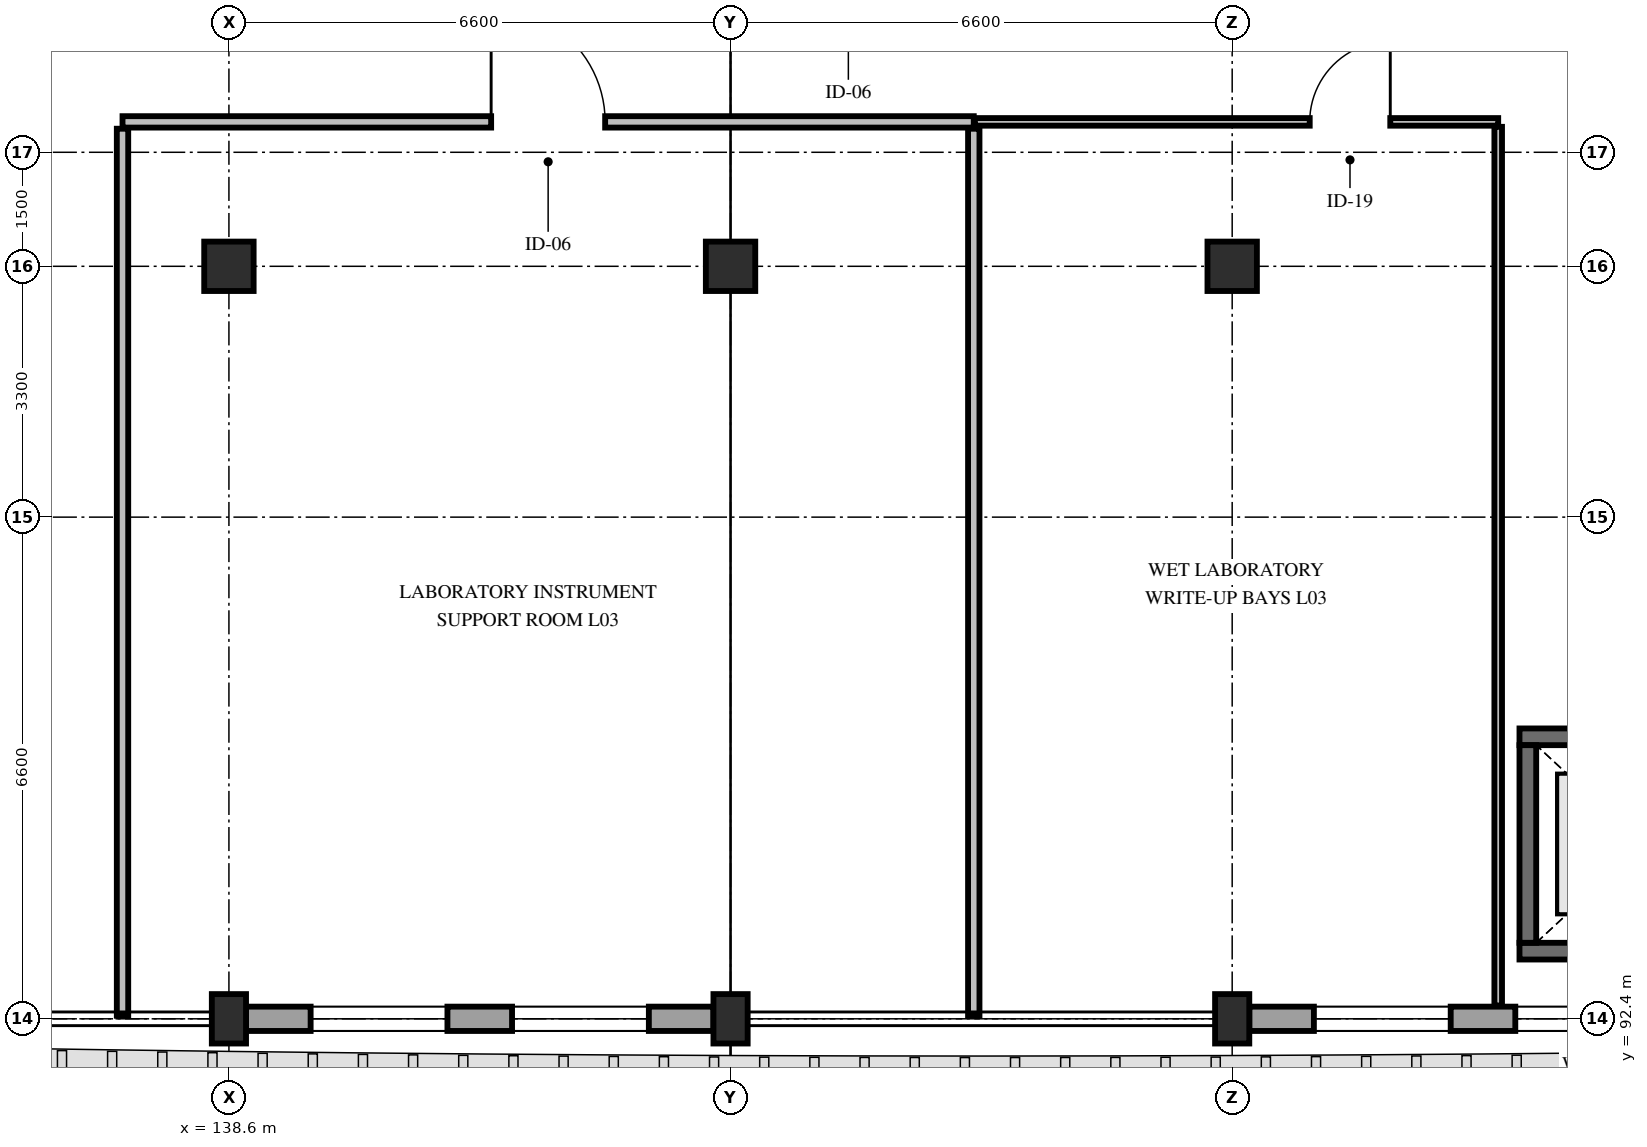
"""IFC4 building model, lengths in metres.
Left out: names, types, materials, properties, quantities, classifications, styles, units other than length and angle.
Written with IfcOpenShell. Run it as: python <this file> out.ifc"""

import sys

from ifc_helpers import new_model, si_unit, direction, frame, frame_2d, origin, origin_2d, place, context, subcontext, project, spatial, rectangle, extrude, element, fill, save


model = new_model("IFC4")
c1 = context("Model", 3, precision=1e-05, world=origin(), true_north=direction((0.0, 1.0)))
c2 = subcontext(c1, "Body", "Model", "MODEL_VIEW")
j1 = project(units=[si_unit("LENGTHUNIT", "METRE"), si_unit("PLANEANGLEUNIT", "RADIAN")], contexts=[c1])
p1 = place(None, origin())
s1 = spatial("IfcSite", under=j1, at=p1, CompositionType="ELEMENT")
p2 = place(p1, origin())
s2 = spatial("IfcBuilding", under=s1, at=p2, CompositionType="ELEMENT")
p3 = place(p2, frame((0.0, 0.0, 15.0)))
s3 = spatial("IfcBuildingStorey", under=s2, at=p3, CompositionType="ELEMENT", Elevation=15.0)
p4 = place(p3, frame((138.6, 92.4, 0.0), z_axis=(0.0, 0.0, 1.0), x_axis=(1.0, 0.0, 0.0)))
e1 = element("IfcColumn", 1, at=p4, inside=s3, PredefinedType="PILASTER", context=c2, shape_type="SweptSolid", body=[
    extrude(rectangle(XDim=0.45, YDim=0.65, at=origin_2d()), origin(), (0.0, 0.0, 1.0), 4.8),
])
p5 = place(p3, frame((138.6, 102.3, 0.0), z_axis=(0.0, 0.0, 1.0), x_axis=(1.0, 0.0, 0.0)))
e2 = element("IfcColumn", 2, at=p5, inside=s3, PredefinedType="COLUMN", context=c2, shape_type="SweptSolid", body=[
    extrude(rectangle(XDim=0.65, YDim=0.65, at=origin_2d()), origin(), (0.0, 0.0, 1.0), 4.8),
])
p6 = place(p3, frame((145.2, 92.4, 0.0), z_axis=(0.0, 0.0, 1.0), x_axis=(1.0, 0.0, 0.0)))
e3 = element("IfcColumn", 3, at=p6, inside=s3, PredefinedType="PILASTER", context=c2, shape_type="SweptSolid", body=[
    extrude(rectangle(XDim=0.45, YDim=0.65, at=origin_2d()), origin(), (0.0, 0.0, 1.0), 4.8),
])
p7 = place(p3, frame((145.2, 102.3, 0.0), z_axis=(0.0, 0.0, 1.0), x_axis=(1.0, 0.0, 0.0)))
e4 = element("IfcColumn", 4, at=p7, inside=s3, PredefinedType="COLUMN", context=c2, shape_type="SweptSolid", body=[
    extrude(rectangle(XDim=0.65, YDim=0.65, at=origin_2d()), origin(), (0.0, 0.0, 1.0), 4.8),
])
p8 = place(p3, frame((151.8, 92.4, 0.0), z_axis=(0.0, 0.0, 1.0), x_axis=(1.0, 0.0, 0.0)))
e5 = element("IfcColumn", 5, at=p8, inside=s3, PredefinedType="PILASTER", context=c2, shape_type="SweptSolid", body=[
    extrude(rectangle(XDim=0.45, YDim=0.65, at=origin_2d()), origin(), (0.0, 0.0, 1.0), 4.8),
])
p9 = place(p3, frame((151.8, 102.3, 0.0), z_axis=(0.0, 0.0, 1.0), x_axis=(1.0, 0.0, 0.0)))
e6 = element("IfcColumn", 6, at=p9, inside=s3, PredefinedType="COLUMN", context=c2, shape_type="SweptSolid", body=[
    extrude(rectangle(XDim=0.65, YDim=0.65, at=origin_2d()), origin(), (0.0, 0.0, 1.0), 4.8),
])
p10 = place(p3, frame((158.175, 92.4, 0.0), z_axis=(0.0, 0.0, 1.0), x_axis=(-1.0, 0.0, 0.0)))
e7 = element("IfcWall", 7, at=p10, inside=s3, PredefinedType="STANDARD", context=c2, shape_type="SweptSolid", body=[
    extrude(rectangle(XDim=6.15, YDim=0.32, at=frame_2d((3.075, 0.0))), origin(), (0.0, 0.0, 1.0), 3.78),
])
p11 = place(p10, frame((0.85, 0.0, 0.85)))
e8 = element("IfcOpeningElement", 8, at=p11, cuts=e7, PredefinedType="OPENING", context=c2, shape_type="SweptSolid", body=[
    extrude(rectangle(XDim=1.8, YDim=2.24, at=frame_2d((0.9, 1.12))), frame((0.0, 0.175, 0.0), z_axis=(0.0, -1.0, 0.0), x_axis=(1.0, 0.0, 0.0)), (0.0, 0.0, 1.0), 0.35),
])
p12 = place(p10, frame((3.5, 0.0, 0.85)))
e9 = element("IfcOpeningElement", 9, at=p12, cuts=e7, PredefinedType="OPENING", context=c2, shape_type="SweptSolid", body=[
    extrude(rectangle(XDim=1.8, YDim=2.24, at=frame_2d((0.9, 1.12))), frame((0.0, 0.175, 0.0), z_axis=(0.0, -1.0, 0.0), x_axis=(1.0, 0.0, 0.0)), (0.0, 0.0, 1.0), 0.35),
])
p13 = place(p3, frame((144.975, 92.4, 0.0), z_axis=(0.0, 0.0, 1.0), x_axis=(-1.0, 0.0, 0.0)))
e10 = element("IfcWall", 10, at=p13, inside=s3, PredefinedType="STANDARD", context=c2, shape_type="SweptSolid", body=[
    extrude(rectangle(XDim=6.15, YDim=0.32, at=frame_2d((3.075, 0.0))), origin(), (0.0, 0.0, 1.0), 3.78),
])
p14 = place(p13, frame((0.85, 0.0, 0.85)))
e11 = element("IfcOpeningElement", 11, at=p14, cuts=e10, PredefinedType="OPENING", context=c2, shape_type="SweptSolid", body=[
    extrude(rectangle(XDim=1.8, YDim=2.24, at=frame_2d((0.9, 1.12))), frame((0.0, 0.175, 0.0), z_axis=(0.0, -1.0, 0.0), x_axis=(1.0, 0.0, 0.0)), (0.0, 0.0, 1.0), 0.35),
])
p15 = place(p13, frame((3.5, 0.0, 0.85)))
e12 = element("IfcOpeningElement", 12, at=p15, cuts=e10, PredefinedType="OPENING", context=c2, shape_type="SweptSolid", body=[
    extrude(rectangle(XDim=1.8, YDim=2.24, at=frame_2d((0.9, 1.12))), frame((0.0, 0.175, 0.0), z_axis=(0.0, -1.0, 0.0), x_axis=(1.0, 0.0, 0.0)), (0.0, 0.0, 1.0), 0.35),
])
p16 = place(p3, frame((155.58, 93.29, 0.0), z_axis=(0.0, 0.0, 1.0), x_axis=(1.0, 0.0, 0.0)))
e13 = element("IfcWall", 13, at=p16, inside=s3, PredefinedType="SHEAR", context=c2, shape_type="SweptSolid", body=[
    extrude(rectangle(XDim=3.24, YDim=0.22, at=frame_2d((1.62, 0.0))), origin(), (0.0, 0.0, 1.0), 4.48),
])
p17 = place(p3, frame((155.58, 96.11, 0.0), z_axis=(0.0, 0.0, 1.0), x_axis=(1.0, 0.0, 0.0)))
e14 = element("IfcWall", 14, at=p17, inside=s3, PredefinedType="SHEAR", context=c2, shape_type="SweptSolid", body=[
    extrude(rectangle(XDim=3.24, YDim=0.22, at=frame_2d((1.62, 0.0))), origin(), (0.0, 0.0, 1.0), 4.48),
])
p18 = place(p17, frame((0.92, 0.0, 0.0)))
e15 = element("IfcOpeningElement", 15, at=p18, cuts=e14, PredefinedType="OPENING", context=c2, shape_type="SweptSolid", body=[
    extrude(rectangle(XDim=1.4, YDim=2.3, at=frame_2d((0.7, 1.15))), frame((0.0, 0.125, 0.0), z_axis=(0.0, -1.0, 0.0), x_axis=(1.0, 0.0, 0.0)), (0.0, 0.0, 1.0), 0.25),
])
p19 = place(p3, frame((155.69, 93.4, 0.0), z_axis=(0.0, 0.0, 1.0), x_axis=(0.0, 1.0, 0.0)))
e16 = element("IfcWall", 16, at=p19, inside=s3, PredefinedType="SHEAR", context=c2, shape_type="SweptSolid", body=[
    extrude(rectangle(XDim=2.6, YDim=0.22, at=frame_2d((1.3, 0.0))), origin(), (0.0, 0.0, 1.0), 4.48),
])
p20 = place(p3, frame((137.2, 104.2, 0.0), z_axis=(0.0, 0.0, 1.0), x_axis=(1.0, 0.0, 0.0)))
e17 = element("IfcWall", 17, at=p20, inside=s3, PredefinedType="PARTITIONING", context=c2, shape_type="SweptSolid", body=[
    extrude(rectangle(XDim=11.2, YDim=0.15, at=frame_2d((5.6, 0.0))), origin(), (0.0, 0.0, 1.0), 3.78),
])
p21 = place(p20, frame((4.85, 0.0, 0.0)))
e18 = element("IfcOpeningElement", 18, at=p21, cuts=e17, PredefinedType="OPENING", context=c2, shape_type="SweptSolid", body=[
    extrude(rectangle(XDim=1.5, YDim=2.25, at=frame_2d((0.75, 1.125))), frame((0.0, 0.09, 0.0), z_axis=(0.0, -1.0, 0.0), x_axis=(1.0, 0.0, 0.0)), (0.0, 0.0, 1.0), 0.18),
])
for number, where, z_axis, x_axis in (
    (19, (137.2, 92.44, 0.0), (0.0, 0.0, 1.0), (0.0, 1.0, 0.0)),
    (20, (148.4, 92.44, 0.0), (0.0, 0.0, 1.0), (0.0, 1.0, 0.0)),
):
    element("IfcWall", number, at=place(p3, frame(where, z_axis=z_axis, x_axis=x_axis)), inside=s3, PredefinedType="PARTITIONING", context=c2, shape_type="SweptSolid", body=[
        extrude(rectangle(XDim=11.67, YDim=0.15, at=frame_2d((5.835, 0.0))), origin(), (0.0, 0.0, 1.0), 3.93),
    ])
p22 = place(p3, frame((148.415, 104.2, 0.0), z_axis=(0.0, 0.0, 1.0), x_axis=(1.0, 0.0, 0.0)))
e21 = element("IfcWall", 21, at=p22, inside=s3, PredefinedType="PARTITIONING", context=c2, shape_type="SweptSolid", body=[
    extrude(rectangle(XDim=6.885, YDim=0.1, at=frame_2d((3.442, 0.0))), origin(), (0.0, 0.0, 1.0), 3.78),
])
p23 = place(p22, frame((4.405, 0.0, 0.0)))
e22 = element("IfcOpeningElement", 22, at=p23, cuts=e21, PredefinedType="OPENING", context=c2, shape_type="SweptSolid", body=[
    extrude(rectangle(XDim=1.06, YDim=2.2, at=frame_2d((0.53, 1.1))), frame((0.0, 0.065, 0.0), z_axis=(0.0, -1.0, 0.0), x_axis=(1.0, 0.0, 0.0)), (0.0, 0.0, 1.0), 0.13),
])
p24 = place(p3, frame((155.3, 92.575, 0.0), z_axis=(0.0, 0.0, 1.0), x_axis=(0.0, 1.0, 0.0)))
e23 = element("IfcWall", 23, at=p24, inside=s3, PredefinedType="PARTITIONING", context=c2, shape_type="SweptSolid", body=[
    extrude(rectangle(XDim=11.56, YDim=0.1, at=frame_2d((5.78, 0.0))), origin(), (0.0, 0.0, 1.0), 3.93),
])
p25 = place(p11, origin())
e24 = element("IfcWindow", 24, at=p25, inside=s3, PartitioningType="DOUBLE_PANEL_VERTICAL", PredefinedType="WINDOW", context=c2, shape_type="SweptSolid", body=[
    extrude(rectangle(XDim=1.8, YDim=2.24, at=frame_2d((0.9, 1.12))), frame((0.0, 0.03, 0.0), z_axis=(0.0, -1.0, 0.0), x_axis=(1.0, 0.0, 0.0)), (0.0, 0.0, 1.0), 0.06),
])
fill(e8, e24)
p26 = place(p12, origin())
e25 = element("IfcWindow", 25, at=p26, inside=s3, PartitioningType="DOUBLE_PANEL_VERTICAL", PredefinedType="WINDOW", context=c2, shape_type="SweptSolid", body=[
    extrude(rectangle(XDim=1.8, YDim=2.24, at=frame_2d((0.9, 1.12))), frame((0.0, 0.03, 0.0), z_axis=(0.0, -1.0, 0.0), x_axis=(1.0, 0.0, 0.0)), (0.0, 0.0, 1.0), 0.06),
])
fill(e9, e25)
p27 = place(p14, origin())
e26 = element("IfcWindow", 26, at=p27, inside=s3, PartitioningType="DOUBLE_PANEL_VERTICAL", PredefinedType="WINDOW", context=c2, shape_type="SweptSolid", body=[
    extrude(rectangle(XDim=1.8, YDim=2.24, at=frame_2d((0.9, 1.12))), frame((0.0, 0.03, 0.0), z_axis=(0.0, -1.0, 0.0), x_axis=(1.0, 0.0, 0.0)), (0.0, 0.0, 1.0), 0.06),
])
fill(e11, e26)
p28 = place(p15, origin())
e27 = element("IfcWindow", 27, at=p28, inside=s3, PartitioningType="DOUBLE_PANEL_VERTICAL", PredefinedType="WINDOW", context=c2, shape_type="SweptSolid", body=[
    extrude(rectangle(XDim=1.8, YDim=2.24, at=frame_2d((0.9, 1.12))), frame((0.0, 0.03, 0.0), z_axis=(0.0, -1.0, 0.0), x_axis=(1.0, 0.0, 0.0)), (0.0, 0.0, 1.0), 0.06),
])
fill(e12, e27)
p29 = place(p21, origin())
e28 = element("IfcDoor", 28, at=p29, inside=s3, OperationType="SINGLE_SWING_LEFT", PredefinedType="DOOR", context=c2, shape_type="SweptSolid", body=[
    extrude(rectangle(XDim=1.5, YDim=2.25, at=frame_2d((0.75, 1.125))), frame((0.0, 0.025, 0.0), z_axis=(0.0, -1.0, 0.0), x_axis=(1.0, 0.0, 0.0)), (0.0, 0.0, 1.0), 0.05),
])
fill(e18, e28)
p30 = place(p23, origin())
e29 = element("IfcDoor", 29, at=p30, inside=s3, OperationType="SINGLE_SWING_RIGHT", PredefinedType="DOOR", context=c2, shape_type="SweptSolid", body=[
    extrude(rectangle(XDim=1.06, YDim=2.2, at=frame_2d((0.53, 1.1))), frame((0.0, 0.025, 0.0), z_axis=(0.0, -1.0, 0.0), x_axis=(1.0, 0.0, 0.0)), (0.0, 0.0, 1.0), 0.05),
])
fill(e22, e29)
save(model, sys.argv[1])
